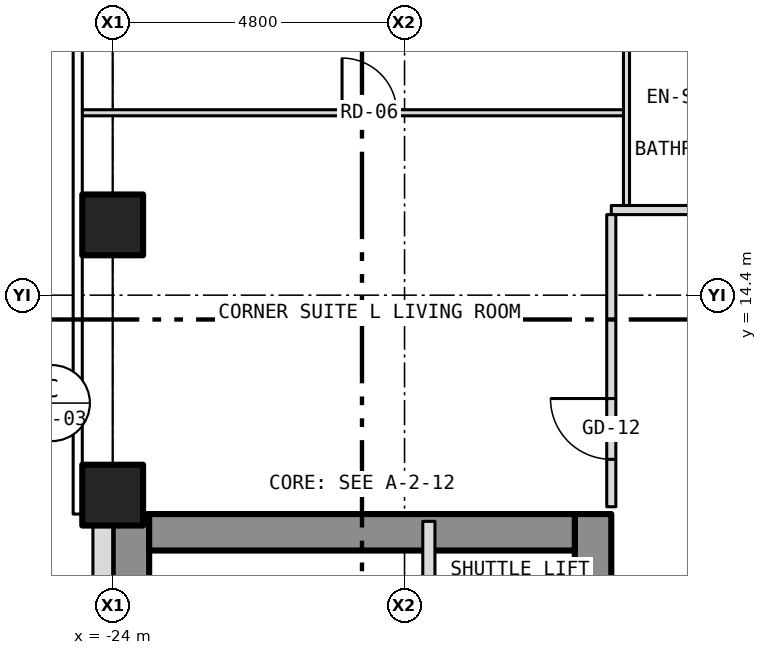
"""IFC4 building model, lengths in metres.
Left out: names, types, materials, properties, quantities, classifications, styles, units other than length and angle.
Written with IfcOpenShell. Run it as: python <this file> out.ifc"""

import sys

from ifc_helpers import new_model, si_unit, direction, frame, frame_2d, origin, origin_2d, place, context, subcontext, project, spatial, rectangle, hollow_rectangle, extrude, element, fill, save


model = new_model("IFC4")
c1 = context("Model", 3, precision=1e-05, world=origin(), true_north=direction((0.0, 1.0)))
c2 = subcontext(c1, "Body", "Model", "MODEL_VIEW")
j1 = project(units=[si_unit("LENGTHUNIT", "METRE"), si_unit("PLANEANGLEUNIT", "RADIAN")], contexts=[c1])
p1 = place(None, origin())
s1 = spatial("IfcSite", under=j1, at=p1, CompositionType="ELEMENT")
p2 = place(p1, origin())
s2 = spatial("IfcBuilding", under=s1, at=p2, CompositionType="ELEMENT")
p3 = place(p2, frame((0.0, 0.0, 46.0)))
s3 = spatial("IfcBuildingStorey", under=s2, at=p3, CompositionType="ELEMENT", Elevation=46.0)
for number, where, z_axis, x_axis in (
    (1, (-24.0, 11.111, -0.15), (0.0, 0.0, 1.0), (1.0, 0.0, 0.0)),
    (2, (-24.0, 15.556, -0.15), (0.0, 0.0, 1.0), (1.0, 0.0, 0.0)),
):
    element("IfcColumn", number, at=place(p3, frame(where, z_axis=z_axis, x_axis=x_axis)), inside=s3, PredefinedType="COLUMN", context=c2, shape_type="SweptSolid", body=[
        extrude(hollow_rectangle(XDim=1.0, YDim=1.0, WallThickness=0.06, at=origin_2d()), origin(), (0.0, 0.0, 1.0), 3.5),
    ])
p4 = place(p3, frame((-16.1, -10.8, 0.0), z_axis=(0.0, 0.0, 1.0), x_axis=(0.0, 1.0, 0.0)))
e3 = element("IfcWall", 3, at=p4, inside=s3, PredefinedType="SHEAR", context=c2, shape_type="SweptSolid", body=[
    extrude(rectangle(XDim=21.6, YDim=0.6, at=frame_2d((10.8, 0.0))), origin(), (0.0, 0.0, 1.0), 3.25),
])
p5 = place(p4, frame((9.4, 0.0, 0.0)))
e4 = element("IfcOpeningElement", 4, at=p5, cuts=e3, PredefinedType="OPENING", context=c2, shape_type="SweptSolid", body=[
    extrude(rectangle(XDim=1.1, YDim=2.1, at=frame_2d((0.55, 1.05))), frame((0.0, 0.312, 0.0), z_axis=(0.0, -1.0, 0.0), x_axis=(1.0, 0.0, 0.0)), (0.0, 0.0, 1.0), 0.624),
])
p6 = place(p4, frame((11.5, 0.0, 0.0)))
e5 = element("IfcOpeningElement", 5, at=p6, cuts=e3, PredefinedType="OPENING", context=c2, shape_type="SweptSolid", body=[
    extrude(rectangle(XDim=1.1, YDim=2.1, at=frame_2d((0.55, 1.05))), frame((0.0, 0.312, 0.0), z_axis=(0.0, -1.0, 0.0), x_axis=(1.0, 0.0, 0.0)), (0.0, 0.0, 1.0), 0.624),
])
p7 = place(p4, frame((13.6, 0.0, 0.0)))
e6 = element("IfcOpeningElement", 6, at=p7, cuts=e3, PredefinedType="OPENING", context=c2, shape_type="SweptSolid", body=[
    extrude(rectangle(XDim=1.1, YDim=2.1, at=frame_2d((0.55, 1.05))), frame((0.0, 0.312, 0.0), z_axis=(0.0, -1.0, 0.0), x_axis=(1.0, 0.0, 0.0)), (0.0, 0.0, 1.0), 0.624),
])
p8 = place(p4, frame((15.7, 0.0, 0.0)))
e7 = element("IfcOpeningElement", 7, at=p8, cuts=e3, PredefinedType="OPENING", context=c2, shape_type="SweptSolid", body=[
    extrude(rectangle(XDim=1.1, YDim=2.1, at=frame_2d((0.55, 1.05))), frame((0.0, 0.312, 0.0), z_axis=(0.0, -1.0, 0.0), x_axis=(1.0, 0.0, 0.0)), (0.0, 0.0, 1.0), 0.624),
])
p9 = place(p4, frame((17.8, 0.0, 0.0)))
e8 = element("IfcOpeningElement", 8, at=p9, cuts=e3, PredefinedType="OPENING", context=c2, shape_type="SweptSolid", body=[
    extrude(rectangle(XDim=1.1, YDim=2.1, at=frame_2d((0.55, 1.05))), frame((0.0, 0.312, 0.0), z_axis=(0.0, -1.0, 0.0), x_axis=(1.0, 0.0, 0.0)), (0.0, 0.0, 1.0), 0.624),
])
p10 = place(p4, frame((0.758, 0.0, 0.0)))
e9 = element("IfcOpeningElement", 9, at=p10, cuts=e3, PredefinedType="OPENING", context=c2, shape_type="SweptSolid", body=[
    extrude(rectangle(XDim=1.1, YDim=2.1, at=frame_2d((0.55, 1.05))), frame((0.0, 0.312, 0.0), z_axis=(0.0, -1.0, 0.0), x_axis=(1.0, 0.0, 0.0)), (0.0, 0.0, 1.0), 0.624),
])
p11 = place(p4, frame((7.5, 0.0, 0.0)))
e10 = element("IfcOpeningElement", 10, at=p11, cuts=e3, PredefinedType="OPENING", context=c2, shape_type="SweptSolid", body=[
    extrude(rectangle(XDim=1.1, YDim=2.1, at=frame_2d((0.55, 1.05))), frame((0.0, 0.312, 0.0), z_axis=(0.0, -1.0, 0.0), x_axis=(1.0, 0.0, 0.0)), (0.0, 0.0, 1.0), 0.624),
])
p12 = place(p3, frame((-23.7, -10.8, 0.0), z_axis=(0.0, 0.0, 1.0), x_axis=(0.0, 1.0, 0.0)))
e11 = element("IfcWall", 11, at=p12, inside=s3, PredefinedType="SHEAR", context=c2, shape_type="SweptSolid", body=[
    extrude(rectangle(XDim=21.6, YDim=0.6, at=frame_2d((10.8, 0.0))), origin(), (0.0, 0.0, 1.0), 3.25),
])
p13 = place(p3, frame((-23.4, 10.5, 0.0), z_axis=(0.0, 0.0, 1.0), x_axis=(1.0, 0.0, 0.0)))
e12 = element("IfcWall", 12, at=p13, inside=s3, PredefinedType="SHEAR", context=c2, shape_type="SweptSolid", body=[
    extrude(rectangle(XDim=7.0, YDim=0.6, at=frame_2d((3.5, 0.0))), origin(), (0.0, 0.0, 1.0), 3.25),
])
p14 = place(p3, frame((-24.163, 10.8, 0.0), z_axis=(0.0, 0.0, 1.0), x_axis=(0.0, -1.0, 0.0)))
e13 = element("IfcWall", 13, at=p14, inside=s3, PredefinedType="SOLIDWALL", context=c2, shape_type="SweptSolid", body=[
    extrude(rectangle(XDim=21.6, YDim=0.325, at=frame_2d((10.8, 0.0))), origin(), (0.0, 0.0, 1.0), 3.5),
])
p15 = place(p14, frame((18.05, 0.0, 1.0)))
e14 = element("IfcOpeningElement", 14, at=p15, cuts=e13, PredefinedType="OPENING", context=c2, shape_type="SweptSolid", body=[
    extrude(rectangle(XDim=0.6, YDim=1.5, at=frame_2d((0.3, 0.75))), frame((0.0, 0.175, 0.0), z_axis=(0.0, -1.0, 0.0), x_axis=(1.0, 0.0, 0.0)), (0.0, 0.0, 1.0), 0.349),
])
p16 = place(p3, frame((-15.8, 15.8, 0.0), z_axis=(0.0, 0.0, 1.0), x_axis=(1.0, 0.0, 0.0)))
e15 = element("IfcWall", 15, at=p16, inside=s3, PredefinedType="PARTITIONING", context=c2, shape_type="SweptSolid", body=[
    extrude(rectangle(XDim=31.6, YDim=0.15, at=frame_2d((15.8, 0.0))), origin(), (0.0, 0.0, 1.0), 3.35),
])
p17 = place(p16, frame((3.067, 0.0, 0.0)))
e16 = element("IfcOpeningElement", 16, at=p17, cuts=e15, PredefinedType="OPENING", context=c2, shape_type="SweptSolid", body=[
    extrude(rectangle(XDim=1.0, YDim=2.1, at=frame_2d((0.5, 1.05))), frame((0.0, 0.087, 0.0), z_axis=(0.0, -1.0, 0.0), x_axis=(1.0, 0.0, 0.0)), (0.0, 0.0, 1.0), 0.174),
])
p18 = place(p16, frame((6.189, 0.0, 0.0)))
e17 = element("IfcOpeningElement", 17, at=p18, cuts=e15, PredefinedType="OPENING", context=c2, shape_type="SweptSolid", body=[
    extrude(rectangle(XDim=1.0, YDim=2.1, at=frame_2d((0.5, 1.05))), frame((0.0, 0.087, 0.0), z_axis=(0.0, -1.0, 0.0), x_axis=(1.0, 0.0, 0.0)), (0.0, 0.0, 1.0), 0.174),
])
p19 = place(p16, frame((15.311, 0.0, 0.0)))
e18 = element("IfcOpeningElement", 18, at=p19, cuts=e15, PredefinedType="OPENING", context=c2, shape_type="SweptSolid", body=[
    extrude(rectangle(XDim=1.0, YDim=2.1, at=frame_2d((0.5, 1.05))), frame((0.0, 0.087, 0.0), z_axis=(0.0, -1.0, 0.0), x_axis=(1.0, 0.0, 0.0)), (0.0, 0.0, 1.0), 0.174),
])
p20 = place(p16, frame((21.977, 0.0, 0.0)))
e19 = element("IfcOpeningElement", 19, at=p20, cuts=e15, PredefinedType="OPENING", context=c2, shape_type="SweptSolid", body=[
    extrude(rectangle(XDim=1.0, YDim=2.1, at=frame_2d((0.5, 1.05))), frame((0.0, 0.087, 0.0), z_axis=(0.0, -1.0, 0.0), x_axis=(1.0, 0.0, 0.0)), (0.0, 0.0, 1.0), 0.174),
])
p21 = place(p16, frame((27.534, 0.0, 0.0)))
e20 = element("IfcOpeningElement", 20, at=p21, cuts=e15, PredefinedType="OPENING", context=c2, shape_type="SweptSolid", body=[
    extrude(rectangle(XDim=1.0, YDim=2.1, at=frame_2d((0.5, 1.05))), frame((0.0, 0.087, 0.0), z_axis=(0.0, -1.0, 0.0), x_axis=(1.0, 0.0, 0.0)), (0.0, 0.0, 1.0), 0.174),
])
p22 = place(p3, frame((-24.53, 17.4, 0.0), z_axis=(0.0, 0.0, 1.0), x_axis=(1.0, 0.0, 0.0)))
e21 = element("IfcWall", 21, at=p22, inside=s3, PredefinedType="PARTITIONING", context=c2, shape_type="SweptSolid", body=[
    extrude(rectangle(XDim=8.98, YDim=0.1, at=frame_2d((4.49, 0.0))), origin(), (0.0, 0.0, 1.0), 3.35),
])
p23 = place(p22, frame((4.302, 0.0, 0.0)))
e22 = element("IfcOpeningElement", 22, at=p23, cuts=e21, PredefinedType="OPENING", context=c2, shape_type="SweptSolid", body=[
    extrude(rectangle(XDim=0.9, YDim=2.1, at=frame_2d((0.45, 1.05))), frame((0.0, 0.062, 0.0), z_axis=(0.0, -1.0, 0.0), x_axis=(1.0, 0.0, 0.0)), (0.0, 0.0, 1.0), 0.124),
])
p24 = place(p3, frame((-18.8, -1.8, 0.0), z_axis=(0.0, 0.0, 1.0), x_axis=(0.0, 1.0, 0.0)))
e23 = element("IfcWall", 23, at=p24, inside=s3, PredefinedType="PARTITIONING", context=c2, shape_type="SweptSolid", body=[
    extrude(rectangle(XDim=12.48, YDim=0.2, at=frame_2d((6.24, 0.0))), origin(), (0.0, 0.0, 1.0), 3.25),
])
p25 = place(p3, frame((-15.8, 10.92, 0.0), z_axis=(0.0, 0.0, 1.0), x_axis=(0.0, 1.0, 0.0)))
e24 = element("IfcWall", 24, at=p25, inside=s3, PredefinedType="PARTITIONING", context=c2, shape_type="SweptSolid", body=[
    extrude(rectangle(XDim=4.805, YDim=0.15, at=frame_2d((2.403, 0.0))), origin(), (0.0, 0.0, 1.0), 3.35),
])
p26 = place(p25, frame((0.78, 0.0, 0.0)))
e25 = element("IfcOpeningElement", 25, at=p26, cuts=e24, PredefinedType="OPENING", context=c2, shape_type="SweptSolid", body=[
    extrude(rectangle(XDim=1.0, YDim=2.1, at=frame_2d((0.5, 1.05))), frame((0.0, 0.087, 0.0), z_axis=(0.0, -1.0, 0.0), x_axis=(1.0, 0.0, 0.0)), (0.0, 0.0, 1.0), 0.174),
])
p27 = place(p3, frame((-15.55, 15.875, 0.0), z_axis=(0.0, 0.0, 1.0), x_axis=(0.0, 1.0, 0.0)))
e26 = element("IfcWall", 26, at=p27, inside=s3, PredefinedType="PARTITIONING", context=c2, shape_type="SweptSolid", body=[
    extrude(rectangle(XDim=8.005, YDim=0.1, at=frame_2d((4.002, 0.0))), origin(), (0.0, 0.0, 1.0), 3.35),
])
p28 = place(p26, origin())
e27 = element("IfcDoor", 27, at=p28, inside=s3, OperationType="SINGLE_SWING_RIGHT", PredefinedType="DOOR", context=c2, shape_type="SweptSolid", body=[
    extrude(rectangle(XDim=1.0, YDim=2.1, at=frame_2d((0.5, 1.05))), frame((0.0, 0.025, 0.0), z_axis=(0.0, -1.0, 0.0), x_axis=(1.0, 0.0, 0.0)), (0.0, 0.0, 1.0), 0.05),
])
fill(e25, e27)
p29 = place(p23, origin())
e28 = element("IfcDoor", 28, at=p29, inside=s3, OperationType="SINGLE_SWING_LEFT", PredefinedType="DOOR", context=c2, shape_type="SweptSolid", body=[
    extrude(rectangle(XDim=0.9, YDim=2.1, at=frame_2d((0.45, 1.05))), frame((0.0, 0.025, 0.0), z_axis=(0.0, -1.0, 0.0), x_axis=(1.0, 0.0, 0.0)), (0.0, 0.0, 1.0), 0.05),
])
fill(e22, e28)
save(model, sys.argv[1])
